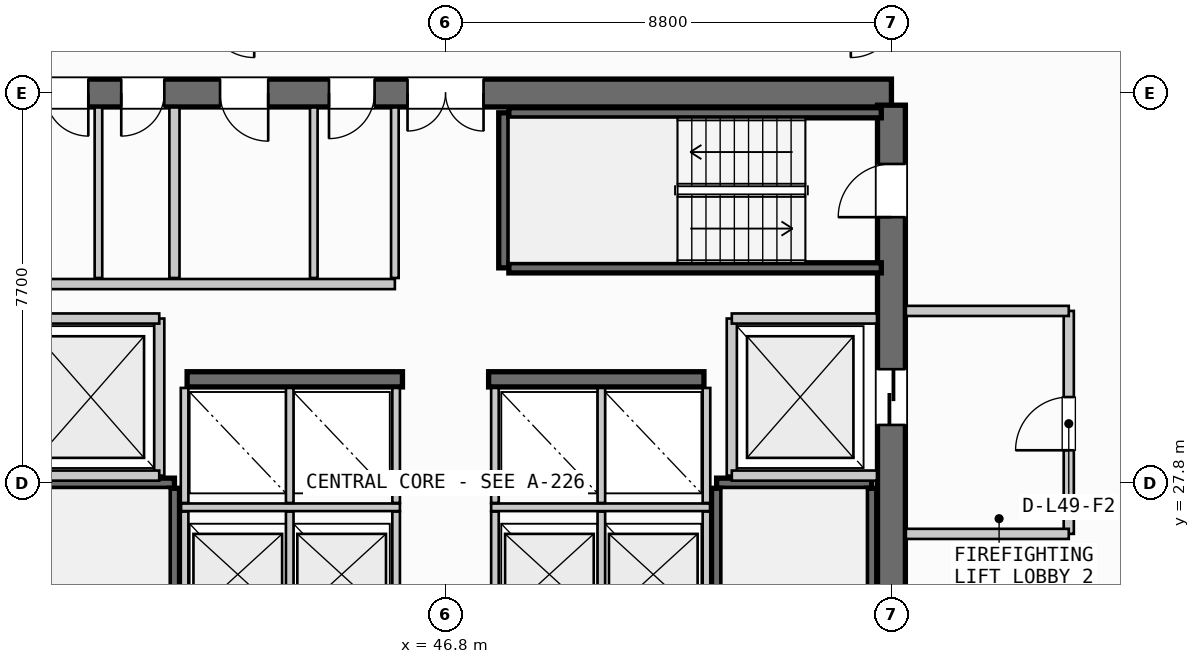
"""IFC4 building model, lengths in metres.
Left out: names, types, materials, properties, quantities, classifications, styles, units other than length and angle.
Written with IfcOpenShell. Run it as: python <this file> out.ifc"""

import sys

from ifc_helpers import new_model, si_unit, direction, frame, frame_2d, origin, place, context, subcontext, project, spatial, rectangle, extrude, source, transform, mapped, element, fill, save


model = new_model("IFC4")
c1 = context("Model", 3, precision=1e-05, world=origin(), true_north=direction((0.0, 1.0)))
c2 = subcontext(c1, "Body", "Model", "MODEL_VIEW")
j1 = project(units=[si_unit("LENGTHUNIT", "METRE"), si_unit("PLANEANGLEUNIT", "RADIAN")], contexts=[c1])
p1 = place(None, origin())
s1 = spatial("IfcSite", under=j1, at=p1, CompositionType="ELEMENT")
p2 = place(p1, origin())
s2 = spatial("IfcBuilding", under=s1, at=p2, CompositionType="ELEMENT")
p3 = place(p2, frame((0.0, 0.0, 190.4)))
s3 = spatial("IfcBuildingStorey", under=s2, at=p3, CompositionType="ELEMENT", Elevation=190.4)
p4 = place(p3, frame((55.6, 35.5, 0.0), z_axis=(0.0, 0.0, 1.0), x_axis=(-1.0, 0.0, 0.0)))
e1 = element("IfcWall", 1, at=p4, inside=s3, PredefinedType="SHEAR", context=c2, shape_type="SweptSolid", body=[
    extrude(rectangle(XDim=17.6, YDim=0.55, at=frame_2d((8.8, 0.0))), origin(), (0.0, 0.0, 1.0), 3.26),
])
p5 = place(p4, frame((8.05, 0.0, 0.0)))
e2 = element("IfcOpeningElement", 2, at=p5, cuts=e1, PredefinedType="OPENING", context=c2, shape_type="SweptSolid", body=[
    extrude(rectangle(XDim=1.5, YDim=2.2, at=frame_2d((0.75, 1.1))), frame((0.0, 0.285, 0.0), z_axis=(0.0, -1.0, 0.0), x_axis=(1.0, 0.0, 0.0)), (0.0, 0.0, 1.0), 0.57),
])
p6 = place(p4, frame((15.85, 0.0, 0.0)))
e3 = element("IfcOpeningElement", 3, at=p6, cuts=e1, PredefinedType="OPENING", context=c2, shape_type="SweptSolid", body=[
    extrude(rectangle(XDim=0.85, YDim=2.15, at=frame_2d((0.425, 1.075))), frame((0.0, 0.285, 0.0), z_axis=(0.0, -1.0, 0.0), x_axis=(1.0, 0.0, 0.0)), (0.0, 0.0, 1.0), 0.57),
])
p7 = place(p4, frame((14.35, 0.0, 0.0)))
e4 = element("IfcOpeningElement", 4, at=p7, cuts=e1, PredefinedType="OPENING", context=c2, shape_type="SweptSolid", body=[
    extrude(rectangle(XDim=0.85, YDim=2.15, at=frame_2d((0.425, 1.075))), frame((0.0, 0.285, 0.0), z_axis=(0.0, -1.0, 0.0), x_axis=(1.0, 0.0, 0.0)), (0.0, 0.0, 1.0), 0.57),
])
p8 = place(p4, frame((12.3, 0.0, 0.0)))
e5 = element("IfcOpeningElement", 5, at=p8, cuts=e1, PredefinedType="OPENING", context=c2, shape_type="SweptSolid", body=[
    extrude(rectangle(XDim=0.95, YDim=2.15, at=frame_2d((0.475, 1.075))), frame((0.0, 0.285, 0.0), z_axis=(0.0, -1.0, 0.0), x_axis=(1.0, 0.0, 0.0)), (0.0, 0.0, 1.0), 0.57),
])
p9 = place(p4, frame((10.2, 0.0, 0.0)))
e6 = element("IfcOpeningElement", 6, at=p9, cuts=e1, PredefinedType="OPENING", context=c2, shape_type="SweptSolid", body=[
    extrude(rectangle(XDim=0.9, YDim=2.15, at=frame_2d((0.45, 1.075))), frame((0.0, 0.285, 0.0), z_axis=(0.0, -1.0, 0.0), x_axis=(1.0, 0.0, 0.0)), (0.0, 0.0, 1.0), 0.57),
])
p10 = place(p3, frame((55.6, 20.34, 0.0), z_axis=(0.0, 0.0, 1.0), x_axis=(0.0, 1.0, 0.0)))
e7 = element("IfcWall", 7, at=p10, inside=s3, PredefinedType="SHEAR", context=c2, shape_type="SweptSolid", body=[
    extrude(rectangle(XDim=14.92, YDim=0.55, at=frame_2d((7.46, 0.0))), origin(), (0.0, 0.0, 1.0), 3.26),
])
p11 = place(p10, frame((12.71, 0.0, 0.0)))
e8 = element("IfcOpeningElement", 8, at=p11, cuts=e7, PredefinedType="OPENING", context=c2, shape_type="SweptSolid", body=[
    extrude(rectangle(XDim=1.05, YDim=2.15, at=frame_2d((0.525, 1.075))), frame((0.0, 0.285, 0.0), z_axis=(0.0, -1.0, 0.0), x_axis=(1.0, 0.0, 0.0)), (0.0, 0.0, 1.0), 0.57),
])
p12 = place(p10, frame((8.61, 0.0, 0.0)))
e9 = element("IfcOpeningElement", 9, at=p12, cuts=e7, PredefinedType="OPENING", context=c2, shape_type="SweptSolid", body=[
    extrude(rectangle(XDim=1.1, YDim=2.2, at=frame_2d((0.55, 1.1))), frame((0.0, 0.285, 0.0), z_axis=(0.0, -1.0, 0.0), x_axis=(1.0, 0.0, 0.0)), (0.0, 0.0, 1.0), 0.57),
])
for number, where, z_axis, x_axis in (
    (10, (41.7, 29.85, 0.0), (0.0, 0.0, 1.0), (1.0, 0.0, 0.0)),
    (11, (47.65, 29.85, 0.0), (0.0, 0.0, 1.0), (1.0, 0.0, 0.0)),
):
    element("IfcWall", number, at=place(p3, frame(where, z_axis=z_axis, x_axis=x_axis)), inside=s3, PredefinedType="SHEAR", context=c2, shape_type="SweptSolid", body=[
        extrude(rectangle(XDim=4.25, YDim=0.3, at=frame_2d((2.125, 0.0))), origin(), (0.0, 0.0, 1.0), 3.26),
    ])
p13 = place(p3, frame((38.39, 27.8, 0.0), z_axis=(0.0, 0.0, 1.0), x_axis=(1.0, 0.0, 0.0)))
e12 = element("IfcWall", 12, at=p13, inside=s3, PredefinedType="SHEAR", context=c2, shape_type="SweptSolid", body=[
    extrude(rectangle(XDim=3.06, YDim=0.2, at=frame_2d((1.53, 0.0))), origin(), (0.0, 0.0, 1.0), 3.26),
])
p14 = place(p3, frame((41.45, 27.7, 0.0), z_axis=(0.0, 0.0, 1.0), x_axis=(0.0, -1.0, 0.0)))
e13 = element("IfcWall", 13, at=p14, inside=s3, PredefinedType="SHEAR", context=c2, shape_type="SweptSolid", body=[
    extrude(rectangle(XDim=7.35, YDim=0.2, at=frame_2d((3.675, 0.0))), origin(), (0.0, 0.0, 1.0), 3.26),
])
p15 = place(p3, frame((52.15, 27.8, 0.0), z_axis=(0.0, 0.0, 1.0), x_axis=(1.0, 0.0, 0.0)))
e14 = element("IfcWall", 14, at=p15, inside=s3, PredefinedType="SHEAR", context=c2, shape_type="SweptSolid", body=[
    extrude(rectangle(XDim=3.06, YDim=0.2, at=frame_2d((1.53, 0.0))), origin(), (0.0, 0.0, 1.0), 3.26),
])
for number, where, z_axis, x_axis in (
    (15, (55.21, 27.7, 0.0), (0.0, 0.0, 1.0), (0.0, -1.0, 0.0)),
    (16, (52.15, 20.35, 0.0), (0.0, 0.0, 1.0), (0.0, 1.0, 0.0)),
):
    element("IfcWall", number, at=place(p3, frame(where, z_axis=z_axis, x_axis=x_axis)), inside=s3, PredefinedType="SHEAR", context=c2, shape_type="SweptSolid", body=[
        extrude(rectangle(XDim=7.35, YDim=0.2, at=frame_2d((3.675, 0.0))), origin(), (0.0, 0.0, 1.0), 3.26),
    ])
p16 = place(p3, frame((47.95, 32.05, 0.0), z_axis=(0.0, 0.0, 1.0), x_axis=(0.0, 1.0, 0.0)))
e17 = element("IfcWall", 17, at=p16, inside=s3, PredefinedType="SHEAR", context=c2, shape_type="SweptSolid", body=[
    extrude(rectangle(XDim=3.06, YDim=0.2, at=frame_2d((1.53, 0.0))), origin(), (0.0, 0.0, 1.0), 3.26),
])
for number, where, z_axis, x_axis in (
    (18, (48.05, 35.11, 0.0), (0.0, 0.0, 1.0), (1.0, 0.0, 0.0)),
    (19, (55.4, 32.05, 0.0), (0.0, 0.0, 1.0), (-1.0, 0.0, 0.0)),
):
    element("IfcWall", number, at=place(p3, frame(where, z_axis=z_axis, x_axis=x_axis)), inside=s3, PredefinedType="SHEAR", context=c2, shape_type="SweptSolid", body=[
        extrude(rectangle(XDim=7.35, YDim=0.2, at=frame_2d((3.675, 0.0))), origin(), (0.0, 0.0, 1.0), 3.26),
    ])
p17 = place(p3, frame((41.15, 27.95, 0.0), z_axis=(0.0, 0.0, 1.0), x_axis=(0.0, 1.0, 0.0)))
e20 = element("IfcWall", 20, at=p17, inside=s3, PredefinedType="PARTITIONING", context=c2, shape_type="SweptSolid", body=[
    extrude(rectangle(XDim=3.1, YDim=0.2, at=frame_2d((1.55, 0.0))), origin(), (0.0, 0.0, 1.0), 2.735),
])
for number, where, z_axis, x_axis in (
    (21, (38.285, 27.95, 0.0), (0.0, 0.0, 1.0), (1.0, 0.0, 0.0)),
    (22, (38.285, 31.05, 0.0), (0.0, 0.0, 1.0), (1.0, 0.0, 0.0)),
):
    element("IfcWall", number, at=place(p3, frame(where, z_axis=z_axis, x_axis=x_axis)), inside=s3, PredefinedType="PARTITIONING", context=c2, shape_type="SweptSolid", body=[
        extrude(rectangle(XDim=2.865, YDim=0.2, at=frame_2d((1.433, 0.0))), origin(), (0.0, 0.0, 1.0), 2.735),
    ])
p18 = place(p3, frame((52.45, 27.95, 0.0), z_axis=(0.0, 0.0, 1.0), x_axis=(0.0, 1.0, 0.0)))
e23 = element("IfcWall", 23, at=p18, inside=s3, PredefinedType="PARTITIONING", context=c2, shape_type="SweptSolid", body=[
    extrude(rectangle(XDim=3.1, YDim=0.2, at=frame_2d((1.55, 0.0))), origin(), (0.0, 0.0, 1.0), 2.735),
])
for number, where, z_axis, x_axis in (
    (24, (52.45, 27.95, 0.0), (0.0, 0.0, 1.0), (1.0, 0.0, 0.0)),
    (25, (52.45, 31.05, 0.0), (0.0, 0.0, 1.0), (1.0, 0.0, 0.0)),
):
    element("IfcWall", number, at=place(p3, frame(where, z_axis=z_axis, x_axis=x_axis)), inside=s3, PredefinedType="PARTITIONING", context=c2, shape_type="SweptSolid", body=[
        extrude(rectangle(XDim=2.865, YDim=0.2, at=frame_2d((1.433, 0.0))), origin(), (0.0, 0.0, 1.0), 2.735),
    ])
p19 = place(p3, frame((59.1, 26.8, 0.0), z_axis=(0.0, 0.0, 1.0), x_axis=(0.0, 1.0, 0.0)))
e26 = element("IfcWall", 26, at=p19, inside=s3, PredefinedType="PARTITIONING", context=c2, shape_type="SweptSolid", body=[
    extrude(rectangle(XDim=4.4, YDim=0.2, at=frame_2d((2.2, 0.0))), origin(), (0.0, 0.0, 1.0), 2.735),
])
p20 = place(p19, frame((1.65, 0.0, 0.0)))
e27 = element("IfcOpeningElement", 27, at=p20, cuts=e26, PredefinedType="OPENING", context=c2, shape_type="SweptSolid", body=[
    extrude(rectangle(XDim=1.05, YDim=2.15, at=frame_2d((0.525, 1.075))), frame((0.0, 0.11, 0.0), z_axis=(0.0, -1.0, 0.0), x_axis=(1.0, 0.0, 0.0)), (0.0, 0.0, 1.0), 0.22),
])
for number, where, z_axis, x_axis in (
    (28, (55.885, 26.8, 0.0), (0.0, 0.0, 1.0), (1.0, 0.0, 0.0)),
    (29, (55.885, 31.2, 0.0), (0.0, 0.0, 1.0), (1.0, 0.0, 0.0)),
):
    element("IfcWall", number, at=place(p3, frame(where, z_axis=z_axis, x_axis=x_axis)), inside=s3, PredefinedType="PARTITIONING", context=c2, shape_type="SweptSolid", body=[
        extrude(rectangle(XDim=3.215, YDim=0.2, at=frame_2d((1.607, 0.0))), origin(), (0.0, 0.0, 1.0), 2.735),
    ])
p21 = place(p3, frame((41.58, 27.325, 0.0), z_axis=(0.0, 0.0, 1.0), x_axis=(1.0, 0.0, 0.0)))
e30 = element("IfcWall", 30, at=p21, inside=s3, PredefinedType="PARTITIONING", context=c2, shape_type="SweptSolid", body=[
    extrude(rectangle(XDim=4.32, YDim=0.15, at=frame_2d((2.16, 0.0))), origin(), (0.0, 0.0, 1.0), 2.735),
])
p22 = place(p3, frame((47.7, 27.325, 0.0), z_axis=(0.0, 0.0, 1.0), x_axis=(1.0, 0.0, 0.0)))
e31 = element("IfcWall", 31, at=p22, inside=s3, PredefinedType="PARTITIONING", context=c2, shape_type="SweptSolid", body=[
    extrude(rectangle(XDim=4.32, YDim=0.15, at=frame_2d((2.16, 0.0))), origin(), (0.0, 0.0, 1.0), 2.735),
])
for number, where, z_axis, x_axis in (
    (32, (41.65, 24.92, 0.0), (0.0, 0.0, 1.0), (0.0, 1.0, 0.0)),
    (33, (43.725, 24.92, 0.0), (0.0, 0.0, 1.0), (0.0, 1.0, 0.0)),
    (34, (45.825, 24.92, 0.0), (0.0, 0.0, 1.0), (0.0, 1.0, 0.0)),
    (35, (47.775, 24.92, 0.0), (0.0, 0.0, 1.0), (0.0, 1.0, 0.0)),
    (36, (49.875, 24.92, 0.0), (0.0, 0.0, 1.0), (0.0, 1.0, 0.0)),
    (37, (51.95, 24.92, 0.0), (0.0, 0.0, 1.0), (0.0, 1.0, 0.0)),
):
    element("IfcWall", number, at=place(p3, frame(where, z_axis=z_axis, x_axis=x_axis)), inside=s3, PredefinedType="PARTITIONING", context=c2, shape_type="SweptSolid", body=[
        extrude(rectangle(XDim=2.32, YDim=0.15, at=frame_2d((1.16, 0.0))), origin(), (0.0, 0.0, 1.0), 2.735),
    ])
for number, where, z_axis, x_axis in (
    (38, (41.65, 27.41, 0.0), (0.0, 0.0, 1.0), (0.0, 1.0, 0.0)),
    (39, (43.725, 27.41, 0.0), (0.0, 0.0, 1.0), (0.0, 1.0, 0.0)),
    (40, (45.825, 27.41, 0.0), (0.0, 0.0, 1.0), (0.0, 1.0, 0.0)),
    (41, (47.775, 27.41, 0.0), (0.0, 0.0, 1.0), (0.0, 1.0, 0.0)),
    (42, (49.875, 27.41, 0.0), (0.0, 0.0, 1.0), (0.0, 1.0, 0.0)),
    (43, (51.95, 27.41, 0.0), (0.0, 0.0, 1.0), (0.0, 1.0, 0.0)),
):
    element("IfcWall", number, at=place(p3, frame(where, z_axis=z_axis, x_axis=x_axis)), inside=s3, PredefinedType="PARTITIONING", context=c2, shape_type="SweptSolid", body=[
        extrude(rectangle(XDim=2.27, YDim=0.15, at=frame_2d((1.135, 0.0))), origin(), (0.0, 0.0, 1.0), 2.735),
    ])
p23 = place(p3, frame((41.45, 31.85, 0.0), z_axis=(0.0, 0.0, 1.0), x_axis=(0.0, 1.0, 0.0)))
e44 = element("IfcWall", 44, at=p23, inside=s3, PredefinedType="PARTITIONING", context=c2, shape_type="SweptSolid", body=[
    extrude(rectangle(XDim=3.365, YDim=0.2, at=frame_2d((1.683, 0.0))), origin(), (0.0, 0.0, 1.0), 2.735),
])
p24 = place(p3, frame((38.285, 31.73, 0.0), z_axis=(0.0, 0.0, 1.0), x_axis=(1.0, 0.0, 0.0)))
e45 = element("IfcWall", 45, at=p24, inside=s3, PredefinedType="PARTITIONING", context=c2, shape_type="SweptSolid", body=[
    extrude(rectangle(XDim=7.515, YDim=0.2, at=frame_2d((3.758, 0.0))), origin(), (0.0, 0.0, 1.0), 2.735),
])
for number, where, z_axis, x_axis in (
    (46, (45.8, 31.85, 0.0), (0.0, 0.0, 1.0), (0.0, 1.0, 0.0)),
    (47, (39.95, 31.85, 0.0), (0.0, 0.0, 1.0), (0.0, 1.0, 0.0)),
):
    element("IfcWall", number, at=place(p3, frame(where, z_axis=z_axis, x_axis=x_axis)), inside=s3, PredefinedType="PARTITIONING", context=c2, shape_type="SweptSolid", body=[
        extrude(rectangle(XDim=3.365, YDim=0.15, at=frame_2d((1.683, 0.0))), origin(), (0.0, 0.0, 1.0), 2.735),
    ])
p25 = place(p3, frame((44.2, 31.85, 0.0), z_axis=(0.0, 0.0, 1.0), x_axis=(0.0, 1.0, 0.0)))
e48 = element("IfcWall", 48, at=p25, inside=s3, PredefinedType="PLUMBINGWALL", context=c2, shape_type="SweptSolid", body=[
    extrude(rectangle(XDim=3.365, YDim=0.15, at=frame_2d((1.683, 0.0))), origin(), (0.0, 0.0, 1.0), 2.735),
])
m1 = source(origin(), c2, "Body", "SweptSolid", [
    extrude(rectangle(XDim=1.05, YDim=2.15, at=frame_2d((0.525, 1.075))), frame((0.0, 0.025, 0.0), z_axis=(0.0, -1.0, 0.0), x_axis=(1.0, 0.0, 0.0)), (0.0, 0.0, 1.0), 0.05),
])
p26 = place(p11, origin())
e49 = element("IfcDoor", 49, at=p26, inside=s3, OperationType="SINGLE_SWING_LEFT", PredefinedType="DOOR", context=c2, shape_type="MappedRepresentation", body=[
    mapped(m1, transform((0.0, 0.0, 0.0), scale=1.0)),
])
fill(e8, e49)
m2 = source(origin(), c2, "Body", "SweptSolid", [
    extrude(rectangle(XDim=1.5, YDim=2.2, at=frame_2d((0.75, 1.1))), frame((0.0, 0.025, 0.0), z_axis=(0.0, -1.0, 0.0), x_axis=(1.0, 0.0, 0.0)), (0.0, 0.0, 1.0), 0.05),
])
p27 = place(p5, origin())
e50 = element("IfcDoor", 50, at=p27, inside=s3, OperationType="DOUBLE_DOOR_SINGLE_SWING", PredefinedType="DOOR", context=c2, shape_type="MappedRepresentation", body=[
    mapped(m2, transform((0.0, 0.0, 0.0), scale=1.0)),
])
fill(e2, e50)
m3 = source(origin(), c2, "Body", "SweptSolid", [
    extrude(rectangle(XDim=1.1, YDim=2.2, at=frame_2d((0.55, 1.1))), frame((0.0, 0.025, 0.0), z_axis=(0.0, -1.0, 0.0), x_axis=(1.0, 0.0, 0.0)), (0.0, 0.0, 1.0), 0.05),
])
p28 = place(p12, origin())
e51 = element("IfcDoor", 51, at=p28, inside=s3, OperationType="SLIDING_TO_RIGHT", PredefinedType="DOOR", context=c2, shape_type="MappedRepresentation", body=[
    mapped(m3, transform((0.0, 0.0, 0.0), scale=1.0)),
])
fill(e9, e51)
m4 = source(origin(), c2, "Body", "SweptSolid", [
    extrude(rectangle(XDim=0.85, YDim=2.15, at=frame_2d((0.425, 1.075))), frame((0.0, 0.025, 0.0), z_axis=(0.0, -1.0, 0.0), x_axis=(1.0, 0.0, 0.0)), (0.0, 0.0, 1.0), 0.05),
])
p29 = place(p6, origin())
e52 = element("IfcDoor", 52, at=p29, inside=s3, OperationType="SINGLE_SWING_LEFT", PredefinedType="DOOR", context=c2, shape_type="MappedRepresentation", body=[
    mapped(m4, transform((0.0, 0.0, 0.0), scale=1.0)),
])
fill(e3, e52)
p30 = place(p7, origin())
e53 = element("IfcDoor", 53, at=p30, inside=s3, OperationType="SINGLE_SWING_RIGHT", PredefinedType="DOOR", context=c2, shape_type="MappedRepresentation", body=[
    mapped(m4, transform((0.0, 0.0, 0.0), scale=1.0)),
])
fill(e4, e53)
m5 = source(origin(), c2, "Body", "SweptSolid", [
    extrude(rectangle(XDim=0.95, YDim=2.15, at=frame_2d((0.475, 1.075))), frame((0.0, 0.025, 0.0), z_axis=(0.0, -1.0, 0.0), x_axis=(1.0, 0.0, 0.0)), (0.0, 0.0, 1.0), 0.05),
])
p31 = place(p8, origin())
e54 = element("IfcDoor", 54, at=p31, inside=s3, OperationType="SINGLE_SWING_LEFT", PredefinedType="DOOR", context=c2, shape_type="MappedRepresentation", body=[
    mapped(m5, transform((0.0, 0.0, 0.0), scale=1.0)),
])
fill(e5, e54)
m6 = source(origin(), c2, "Body", "SweptSolid", [
    extrude(rectangle(XDim=0.9, YDim=2.15, at=frame_2d((0.45, 1.075))), frame((0.0, 0.025, 0.0), z_axis=(0.0, -1.0, 0.0), x_axis=(1.0, 0.0, 0.0)), (0.0, 0.0, 1.0), 0.05),
])
p32 = place(p9, origin())
e55 = element("IfcDoor", 55, at=p32, inside=s3, OperationType="SINGLE_SWING_RIGHT", PredefinedType="DOOR", context=c2, shape_type="MappedRepresentation", body=[
    mapped(m6, transform((0.0, 0.0, 0.0), scale=1.0)),
])
fill(e6, e55)
p33 = place(p20, origin())
e56 = element("IfcDoor", 56, at=p33, inside=s3, OperationType="SINGLE_SWING_LEFT", PredefinedType="DOOR", context=c2, shape_type="MappedRepresentation", body=[
    mapped(m1, transform((0.0, 0.0, 0.0), scale=1.0)),
])
fill(e27, e56)
save(model, sys.argv[1])
